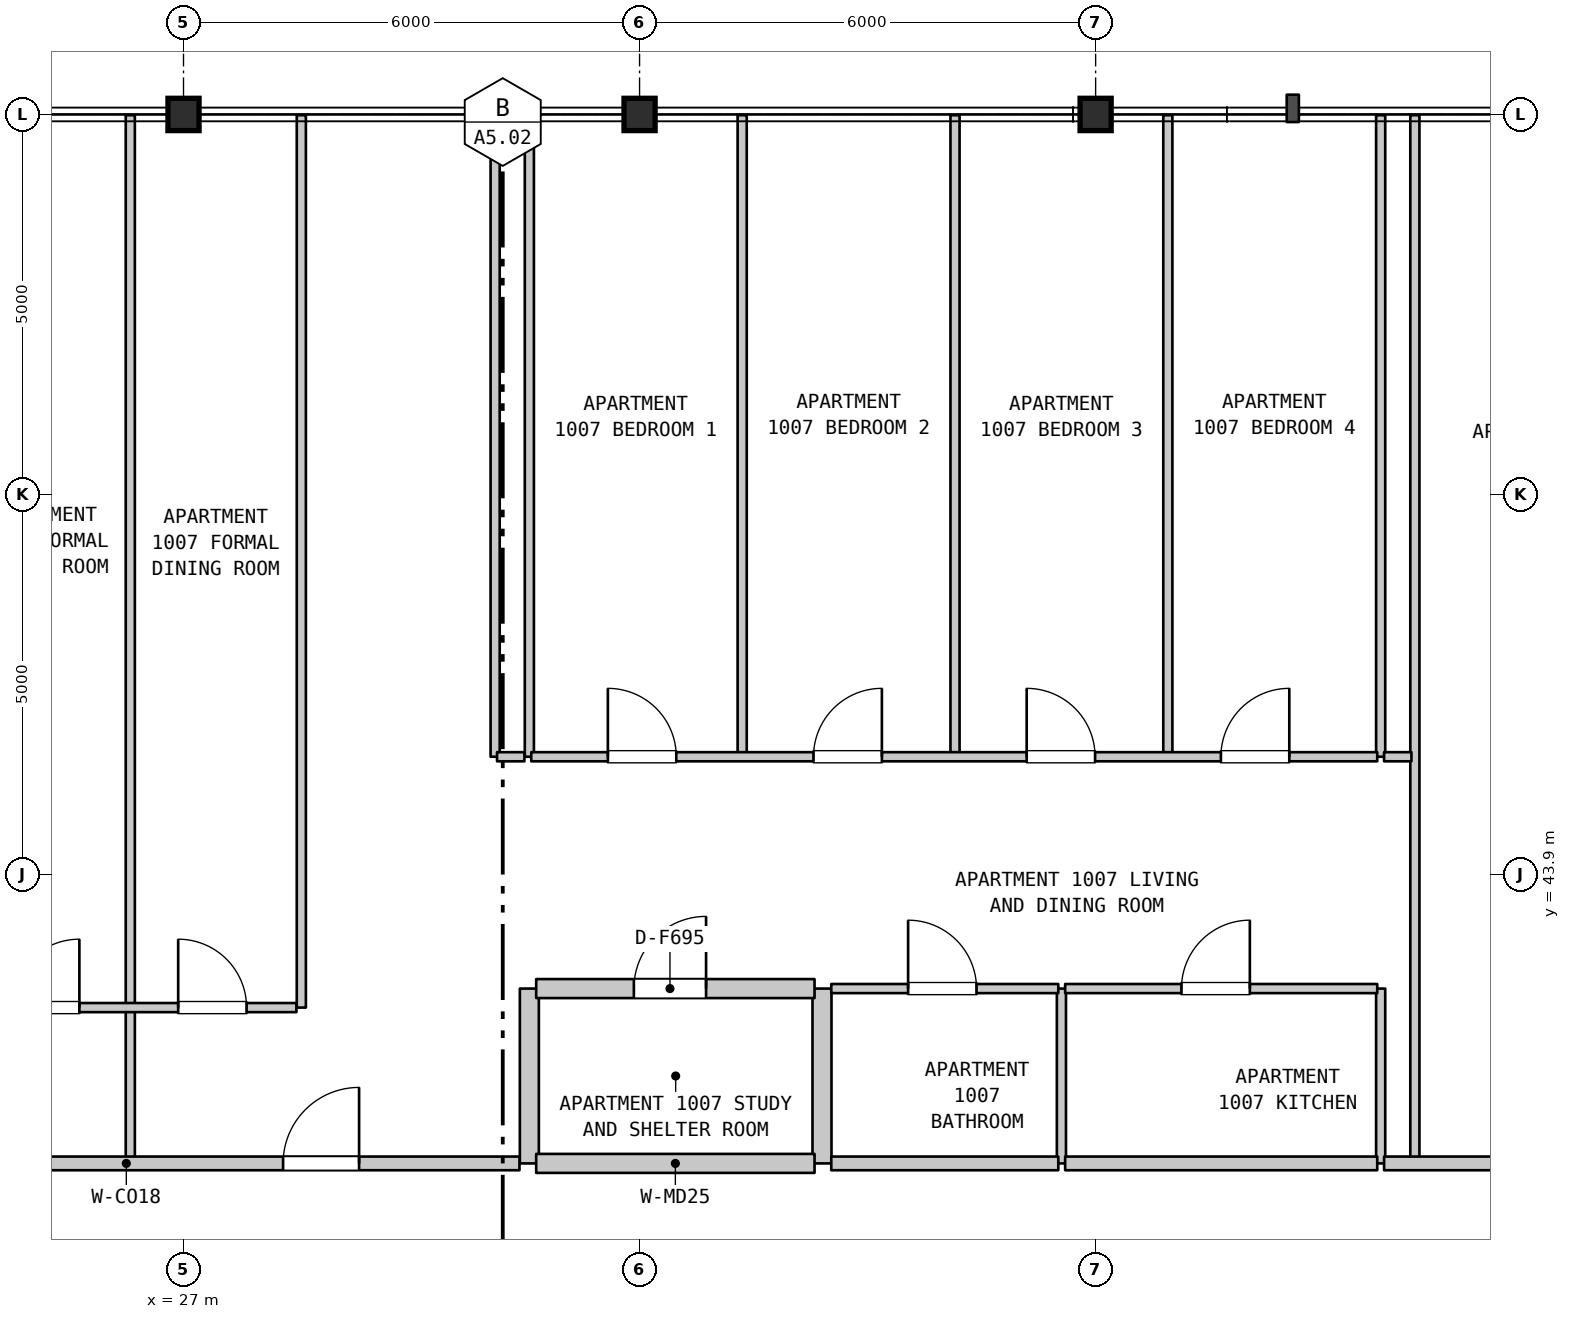
"""IFC4 building model, lengths in metres.
Left out: names, types, materials, properties, quantities, classifications, styles, units other than length and angle.
Written with IfcOpenShell. Run it as: python <this file> out.ifc"""

import sys

from ifc_helpers import new_model, si_unit, direction, frame, frame_2d, origin, origin_2d, place, context, subcontext, project, spatial, rectangle, i_section, extrude, element, fill, save


model = new_model("IFC4")
c1 = context("Model", 3, precision=1e-05, world=origin(), true_north=direction((0.0, 1.0)))
c2 = subcontext(c1, "Body", "Model", "MODEL_VIEW")
j1 = project(units=[si_unit("LENGTHUNIT", "METRE"), si_unit("PLANEANGLEUNIT", "RADIAN")], contexts=[c1])
p1 = place(None, origin())
s1 = spatial("IfcSite", under=j1, at=p1, CompositionType="ELEMENT")
p2 = place(p1, origin())
s2 = spatial("IfcBuilding", under=s1, at=p2, CompositionType="ELEMENT")
p3 = place(p2, frame((0.0, 0.0, 46.2)))
s3 = spatial("IfcBuildingStorey", under=s2, at=p3, CompositionType="ELEMENT", Elevation=46.2)
for number, where, z_axis, x_axis in (
    (1, (27.0, 53.9, 0.0), (0.0, 0.0, 1.0), (1.0, 0.0, 0.0)),
    (2, (33.0, 53.9, 0.0), (0.0, 0.0, 1.0), (1.0, 0.0, 0.0)),
    (3, (39.0, 53.9, 0.0), (0.0, 0.0, 1.0), (1.0, 0.0, 0.0)),
):
    element("IfcColumn", number, at=place(p3, frame(where, z_axis=z_axis, x_axis=x_axis)), inside=s3, PredefinedType="COLUMN", context=c2, shape_type="SweptSolid", body=[
        extrude(i_section(OverallWidth=0.409, OverallDepth=0.425, WebThickness=0.032, FlangeThickness=0.052, FilletRadius=0.015, at=origin_2d()), origin(), (0.0, 0.0, 1.0), 3.7),
    ])
p4 = place(p3, frame((26.3, 40.1, 0.0), z_axis=(0.0, 0.0, 1.0), x_axis=(0.0, 1.0, 0.0)))
e4 = element("IfcWall", 4, at=p4, inside=s3, PredefinedType="PARTITIONING", context=c2, shape_type="SweptSolid", body=[
    extrude(rectangle(XDim=2.05, YDim=0.12, at=frame_2d((1.025, 0.0))), origin(), (0.0, 0.0, 1.0), 3.385),
])
for number, where, z_axis, x_axis in (
    (5, (26.3, 42.15, 0.0), (0.0, 0.0, 1.0), (0.0, 1.0, 0.0)),
    (6, (28.55, 42.15, 0.0), (0.0, 0.0, 1.0), (0.0, 1.0, 0.0)),
):
    element("IfcWall", number, at=place(p3, frame(where, z_axis=z_axis, x_axis=x_axis)), inside=s3, PredefinedType="PARTITIONING", context=c2, shape_type="SweptSolid", body=[
        extrude(rectangle(XDim=11.74, YDim=0.12, at=frame_2d((5.87, 0.0))), origin(), (0.0, 0.0, 1.0), 3.385),
    ])
p5 = place(p3, frame((31.1, 45.45, 0.0), z_axis=(0.0, 0.0, 1.0), x_axis=(0.0, 1.0, 0.0)))
e7 = element("IfcWall", 7, at=p5, inside=s3, PredefinedType="PARTITIONING", context=c2, shape_type="SweptSolid", body=[
    extrude(rectangle(XDim=8.44, YDim=0.12, at=frame_2d((4.22, 0.0))), origin(), (0.0, 0.0, 1.0), 3.385),
])
p6 = place(p3, frame((31.55, 40.1, 0.0), z_axis=(0.0, 0.0, 1.0), x_axis=(0.0, 1.0, 0.0)))
e8 = element("IfcWall", 8, at=p6, inside=s3, PredefinedType="STANDARD", context=c2, shape_type="SweptSolid", body=[
    extrude(rectangle(XDim=2.3, YDim=0.25, at=frame_2d((1.15, 0.0))), origin(), (0.0, 0.0, 1.0), 3.385),
])
for number, where, z_axis, x_axis in (
    (9, (31.55, 45.45, 0.0), (0.0, 0.0, 1.0), (0.0, 1.0, 0.0)),
    (10, (34.35, 45.45, 0.0), (0.0, 0.0, 1.0), (0.0, 1.0, 0.0)),
):
    element("IfcWall", number, at=place(p3, frame(where, z_axis=z_axis, x_axis=x_axis)), inside=s3, PredefinedType="PARTITIONING", context=c2, shape_type="SweptSolid", body=[
        extrude(rectangle(XDim=8.44, YDim=0.12, at=frame_2d((4.22, 0.0))), origin(), (0.0, 0.0, 1.0), 3.385),
    ])
p7 = place(p3, frame((35.4, 40.1, 0.0), z_axis=(0.0, 0.0, 1.0), x_axis=(0.0, 1.0, 0.0)))
e11 = element("IfcWall", 11, at=p7, inside=s3, PredefinedType="STANDARD", context=c2, shape_type="SweptSolid", body=[
    extrude(rectangle(XDim=2.3, YDim=0.25, at=frame_2d((1.15, 0.0))), origin(), (0.0, 0.0, 1.0), 3.385),
])
p8 = place(p3, frame((37.15, 45.45, 0.0), z_axis=(0.0, 0.0, 1.0), x_axis=(0.0, 1.0, 0.0)))
e12 = element("IfcWall", 12, at=p8, inside=s3, PredefinedType="PARTITIONING", context=c2, shape_type="SweptSolid", body=[
    extrude(rectangle(XDim=8.44, YDim=0.12, at=frame_2d((4.22, 0.0))), origin(), (0.0, 0.0, 1.0), 3.385),
])
p9 = place(p3, frame((38.55, 40.1, 0.0), z_axis=(0.0, 0.0, 1.0), x_axis=(0.0, 1.0, 0.0)))
e13 = element("IfcWall", 13, at=p9, inside=s3, PredefinedType="PARTITIONING", context=c2, shape_type="SweptSolid", body=[
    extrude(rectangle(XDim=2.3, YDim=0.12, at=frame_2d((1.15, 0.0))), origin(), (0.0, 0.0, 1.0), 3.385),
])
p10 = place(p3, frame((39.95, 45.45, 0.0), z_axis=(0.0, 0.0, 1.0), x_axis=(0.0, 1.0, 0.0)))
e14 = element("IfcWall", 14, at=p10, inside=s3, PredefinedType="PARTITIONING", context=c2, shape_type="SweptSolid", body=[
    extrude(rectangle(XDim=8.44, YDim=0.12, at=frame_2d((4.22, 0.0))), origin(), (0.0, 0.0, 1.0), 3.385),
])
p11 = place(p3, frame((42.75, 40.1, 0.0), z_axis=(0.0, 0.0, 1.0), x_axis=(0.0, 1.0, 0.0)))
e15 = element("IfcWall", 15, at=p11, inside=s3, PredefinedType="PARTITIONING", context=c2, shape_type="SweptSolid", body=[
    extrude(rectangle(XDim=2.3, YDim=0.12, at=frame_2d((1.15, 0.0))), origin(), (0.0, 0.0, 1.0), 3.385),
])
p12 = place(p3, frame((42.75, 45.45, 0.0), z_axis=(0.0, 0.0, 1.0), x_axis=(0.0, 1.0, 0.0)))
e16 = element("IfcWall", 16, at=p12, inside=s3, PredefinedType="PARTITIONING", context=c2, shape_type="SweptSolid", body=[
    extrude(rectangle(XDim=8.44, YDim=0.12, at=frame_2d((4.22, 0.0))), origin(), (0.0, 0.0, 1.0), 3.385),
])
p13 = place(p3, frame((43.2, 40.1, 0.0), z_axis=(0.0, 0.0, 1.0), x_axis=(0.0, 1.0, 0.0)))
e17 = element("IfcWall", 17, at=p13, inside=s3, PredefinedType="PARTITIONING", context=c2, shape_type="SweptSolid", body=[
    extrude(rectangle(XDim=13.79, YDim=0.12, at=frame_2d((6.895, 0.0))), origin(), (0.0, 0.0, 1.0), 3.385),
])
p14 = place(p3, frame((21.075, 40.1, 0.0), z_axis=(0.0, 0.0, 1.0), x_axis=(1.0, 0.0, 0.0)))
e18 = element("IfcWall", 18, at=p14, inside=s3, PredefinedType="STANDARD", context=c2, shape_type="SweptSolid", body=[
    extrude(rectangle(XDim=10.345, YDim=0.18, at=frame_2d((5.172, 0.0))), origin(), (0.0, 0.0, 1.0), 3.385),
])
p15 = place(p14, frame((2.035, 0.0, 0.0)))
e19 = element("IfcOpeningElement", 19, at=p15, cuts=e18, PredefinedType="OPENING", context=c2, shape_type="SweptSolid", body=[
    extrude(rectangle(XDim=1.0, YDim=2.15, at=frame_2d((0.5, 1.075))), frame((0.0, 0.1, 0.0), z_axis=(0.0, -1.0, 0.0), x_axis=(1.0, 0.0, 0.0)), (0.0, 0.0, 1.0), 0.2),
])
p16 = place(p14, frame((7.235, 0.0, 0.0)))
e20 = element("IfcOpeningElement", 20, at=p16, cuts=e18, PredefinedType="OPENING", context=c2, shape_type="SweptSolid", body=[
    extrude(rectangle(XDim=1.0, YDim=2.15, at=frame_2d((0.5, 1.075))), frame((0.0, 0.1, 0.0), z_axis=(0.0, -1.0, 0.0), x_axis=(1.0, 0.0, 0.0)), (0.0, 0.0, 1.0), 0.2),
])
p17 = place(p3, frame((31.64, 40.1, 0.0), z_axis=(0.0, 0.0, 1.0), x_axis=(1.0, 0.0, 0.0)))
e21 = element("IfcWall", 21, at=p17, inside=s3, PredefinedType="STANDARD", context=c2, shape_type="SweptSolid", body=[
    extrude(rectangle(XDim=3.662, YDim=0.25, at=frame_2d((1.831, 0.0))), origin(), (0.0, 0.0, 1.0), 3.385),
])
p18 = place(p3, frame((35.522, 40.1, 0.0), z_axis=(0.0, 0.0, 1.0), x_axis=(1.0, 0.0, 0.0)))
e22 = element("IfcWall", 22, at=p18, inside=s3, PredefinedType="STANDARD", context=c2, shape_type="SweptSolid", body=[
    extrude(rectangle(XDim=2.987, YDim=0.18, at=frame_2d((1.494, 0.0))), origin(), (0.0, 0.0, 1.0), 3.385),
])
p19 = place(p3, frame((38.599, 40.1, 0.0), z_axis=(0.0, 0.0, 1.0), x_axis=(1.0, 0.0, 0.0)))
e23 = element("IfcWall", 23, at=p19, inside=s3, PredefinedType="STANDARD", context=c2, shape_type="SweptSolid", body=[
    extrude(rectangle(XDim=4.106, YDim=0.18, at=frame_2d((2.053, 0.0))), origin(), (0.0, 0.0, 1.0), 3.385),
])
p20 = place(p3, frame((42.795, 40.1, 0.0), z_axis=(0.0, 0.0, 1.0), x_axis=(1.0, 0.0, 0.0)))
e24 = element("IfcWall", 24, at=p20, inside=s3, PredefinedType="STANDARD", context=c2, shape_type="SweptSolid", body=[
    extrude(rectangle(XDim=3.96, YDim=0.18, at=frame_2d((1.98, 0.0))), origin(), (0.0, 0.0, 1.0), 3.385),
])
p21 = place(p20, frame((1.609, 0.0, 0.0)))
e25 = element("IfcOpeningElement", 25, at=p21, cuts=e24, PredefinedType="OPENING", context=c2, shape_type="SweptSolid", body=[
    extrude(rectangle(XDim=1.0, YDim=2.15, at=frame_2d((0.5, 1.075))), frame((0.0, 0.1, 0.0), z_axis=(0.0, -1.0, 0.0), x_axis=(1.0, 0.0, 0.0)), (0.0, 0.0, 1.0), 0.2),
])
p22 = place(p3, frame((24.075, 42.15, 0.0), z_axis=(0.0, 0.0, 1.0), x_axis=(1.0, 0.0, 0.0)))
e26 = element("IfcWall", 26, at=p22, inside=s3, PredefinedType="PARTITIONING", context=c2, shape_type="SweptSolid", body=[
    extrude(rectangle(XDim=4.41, YDim=0.12, at=frame_2d((2.205, 0.0))), origin(), (0.0, 0.0, 1.0), 3.385),
])
p23 = place(p22, frame((0.655, 0.0, 0.0)))
e27 = element("IfcOpeningElement", 27, at=p23, cuts=e26, PredefinedType="OPENING", context=c2, shape_type="SweptSolid", body=[
    extrude(rectangle(XDim=0.9, YDim=2.15, at=frame_2d((0.45, 1.075))), frame((0.0, 0.07, 0.0), z_axis=(0.0, -1.0, 0.0), x_axis=(1.0, 0.0, 0.0)), (0.0, 0.0, 1.0), 0.14),
])
p24 = place(p22, frame((2.855, 0.0, 0.0)))
e28 = element("IfcOpeningElement", 28, at=p24, cuts=e26, PredefinedType="OPENING", context=c2, shape_type="SweptSolid", body=[
    extrude(rectangle(XDim=0.9, YDim=2.15, at=frame_2d((0.45, 1.075))), frame((0.0, 0.07, 0.0), z_axis=(0.0, -1.0, 0.0), x_axis=(1.0, 0.0, 0.0)), (0.0, 0.0, 1.0), 0.14),
])
p25 = place(p3, frame((31.64, 42.4, 0.0), z_axis=(0.0, 0.0, 1.0), x_axis=(1.0, 0.0, 0.0)))
e29 = element("IfcWall", 29, at=p25, inside=s3, PredefinedType="STANDARD", context=c2, shape_type="SweptSolid", body=[
    extrude(rectangle(XDim=3.662, YDim=0.25, at=frame_2d((1.831, 0.0))), origin(), (0.0, 0.0, 1.0), 3.385),
])
p26 = place(p25, frame((1.285, 0.0, 0.0)))
e30 = element("IfcOpeningElement", 30, at=p26, cuts=e29, PredefinedType="OPENING", context=c2, shape_type="SweptSolid", body=[
    extrude(rectangle(XDim=0.95, YDim=2.15, at=frame_2d((0.475, 1.075))), frame((0.0, 0.135, 0.0), z_axis=(0.0, -1.0, 0.0), x_axis=(1.0, 0.0, 0.0)), (0.0, 0.0, 1.0), 0.27),
])
p27 = place(p3, frame((35.522, 42.4, 0.0), z_axis=(0.0, 0.0, 1.0), x_axis=(1.0, 0.0, 0.0)))
e31 = element("IfcWall", 31, at=p27, inside=s3, PredefinedType="PARTITIONING", context=c2, shape_type="SweptSolid", body=[
    extrude(rectangle(XDim=2.987, YDim=0.12, at=frame_2d((1.494, 0.0))), origin(), (0.0, 0.0, 1.0), 3.385),
])
p28 = place(p27, frame((1.011, 0.0, 0.0)))
e32 = element("IfcOpeningElement", 32, at=p28, cuts=e31, PredefinedType="OPENING", context=c2, shape_type="SweptSolid", body=[
    extrude(rectangle(XDim=0.9, YDim=2.1, at=frame_2d((0.45, 1.05))), frame((0.0, 0.07, 0.0), z_axis=(0.0, -1.0, 0.0), x_axis=(1.0, 0.0, 0.0)), (0.0, 0.0, 1.0), 0.14),
])
p29 = place(p3, frame((38.599, 42.4, 0.0), z_axis=(0.0, 0.0, 1.0), x_axis=(1.0, 0.0, 0.0)))
e33 = element("IfcWall", 33, at=p29, inside=s3, PredefinedType="PARTITIONING", context=c2, shape_type="SweptSolid", body=[
    extrude(rectangle(XDim=4.106, YDim=0.12, at=frame_2d((2.053, 0.0))), origin(), (0.0, 0.0, 1.0), 3.385),
])
p30 = place(p29, frame((1.53, 0.0, 0.0)))
e34 = element("IfcOpeningElement", 34, at=p30, cuts=e33, PredefinedType="OPENING", context=c2, shape_type="SweptSolid", body=[
    extrude(rectangle(XDim=0.9, YDim=2.15, at=frame_2d((0.45, 1.075))), frame((0.0, 0.07, 0.0), z_axis=(0.0, -1.0, 0.0), x_axis=(1.0, 0.0, 0.0)), (0.0, 0.0, 1.0), 0.14),
])
p31 = place(p3, frame((31.125, 45.45, 0.0), z_axis=(0.0, 0.0, 1.0), x_axis=(1.0, 0.0, 0.0)))
e35 = element("IfcWall", 35, at=p31, inside=s3, PredefinedType="PARTITIONING", context=c2, shape_type="SweptSolid", body=[
    extrude(rectangle(XDim=0.36, YDim=0.12, at=frame_2d((0.18, 0.0))), origin(), (0.0, 0.0, 1.0), 3.385),
])
p32 = place(p3, frame((31.575, 45.45, 0.0), z_axis=(0.0, 0.0, 1.0), x_axis=(1.0, 0.0, 0.0)))
e36 = element("IfcWall", 36, at=p32, inside=s3, PredefinedType="PARTITIONING", context=c2, shape_type="SweptSolid", body=[
    extrude(rectangle(XDim=11.13, YDim=0.12, at=frame_2d((5.565, 0.0))), origin(), (0.0, 0.0, 1.0), 3.385),
])
p33 = place(p32, frame((1.008, 0.0, 0.0)))
e37 = element("IfcOpeningElement", 37, at=p33, cuts=e36, PredefinedType="OPENING", context=c2, shape_type="SweptSolid", body=[
    extrude(rectangle(XDim=0.9, YDim=2.15, at=frame_2d((0.45, 1.075))), frame((0.0, 0.07, 0.0), z_axis=(0.0, -1.0, 0.0), x_axis=(1.0, 0.0, 0.0)), (0.0, 0.0, 1.0), 0.14),
])
p34 = place(p32, frame((3.713, 0.0, 0.0)))
e38 = element("IfcOpeningElement", 38, at=p34, cuts=e36, PredefinedType="OPENING", context=c2, shape_type="SweptSolid", body=[
    extrude(rectangle(XDim=0.9, YDim=2.15, at=frame_2d((0.45, 1.075))), frame((0.0, 0.07, 0.0), z_axis=(0.0, -1.0, 0.0), x_axis=(1.0, 0.0, 0.0)), (0.0, 0.0, 1.0), 0.14),
])
p35 = place(p32, frame((6.518, 0.0, 0.0)))
e39 = element("IfcOpeningElement", 39, at=p35, cuts=e36, PredefinedType="OPENING", context=c2, shape_type="SweptSolid", body=[
    extrude(rectangle(XDim=0.9, YDim=2.15, at=frame_2d((0.45, 1.075))), frame((0.0, 0.07, 0.0), z_axis=(0.0, -1.0, 0.0), x_axis=(1.0, 0.0, 0.0)), (0.0, 0.0, 1.0), 0.14),
])
p36 = place(p32, frame((9.073, 0.0, 0.0)))
e40 = element("IfcOpeningElement", 40, at=p36, cuts=e36, PredefinedType="OPENING", context=c2, shape_type="SweptSolid", body=[
    extrude(rectangle(XDim=0.9, YDim=2.15, at=frame_2d((0.45, 1.075))), frame((0.0, 0.07, 0.0), z_axis=(0.0, -1.0, 0.0), x_axis=(1.0, 0.0, 0.0)), (0.0, 0.0, 1.0), 0.14),
])
p37 = place(p3, frame((42.795, 45.45, 0.0), z_axis=(0.0, 0.0, 1.0), x_axis=(1.0, 0.0, 0.0)))
e41 = element("IfcWall", 41, at=p37, inside=s3, PredefinedType="PARTITIONING", context=c2, shape_type="SweptSolid", body=[
    extrude(rectangle(XDim=0.36, YDim=0.12, at=frame_2d((0.18, 0.0))), origin(), (0.0, 0.0, 1.0), 3.385),
])
p38 = place(p16, origin())
e42 = element("IfcDoor", 42, at=p38, inside=s3, OperationType="SINGLE_SWING_RIGHT", PredefinedType="DOOR", context=c2, shape_type="SweptSolid", body=[
    extrude(rectangle(XDim=1.0, YDim=2.15, at=frame_2d((0.5, 1.075))), frame((0.0, 0.025, 0.0), z_axis=(0.0, -1.0, 0.0), x_axis=(1.0, 0.0, 0.0)), (0.0, 0.0, 1.0), 0.05),
])
fill(e20, e42)
p39 = place(p23, origin())
e43 = element("IfcDoor", 43, at=p39, inside=s3, OperationType="SINGLE_SWING_RIGHT", PredefinedType="DOOR", context=c2, shape_type="SweptSolid", body=[
    extrude(rectangle(XDim=0.9, YDim=2.15, at=frame_2d((0.45, 1.075))), frame((0.0, 0.025, 0.0), z_axis=(0.0, -1.0, 0.0), x_axis=(1.0, 0.0, 0.0)), (0.0, 0.0, 1.0), 0.05),
])
fill(e27, e43)
p40 = place(p24, origin())
e44 = element("IfcDoor", 44, at=p40, inside=s3, OperationType="SINGLE_SWING_LEFT", PredefinedType="DOOR", context=c2, shape_type="SweptSolid", body=[
    extrude(rectangle(XDim=0.9, YDim=2.15, at=frame_2d((0.45, 1.075))), frame((0.0, 0.025, 0.0), z_axis=(0.0, -1.0, 0.0), x_axis=(1.0, 0.0, 0.0)), (0.0, 0.0, 1.0), 0.05),
])
fill(e28, e44)
p41 = place(p26, origin())
e45 = element("IfcDoor", 45, at=p41, inside=s3, OperationType="SINGLE_SWING_RIGHT", PredefinedType="DOOR", context=c2, shape_type="SweptSolid", body=[
    extrude(rectangle(XDim=0.95, YDim=2.15, at=frame_2d((0.475, 1.075))), frame((0.0, 0.025, 0.0), z_axis=(0.0, -1.0, 0.0), x_axis=(1.0, 0.0, 0.0)), (0.0, 0.0, 1.0), 0.05),
])
fill(e30, e45)
p42 = place(p28, origin())
e46 = element("IfcDoor", 46, at=p42, inside=s3, OperationType="SINGLE_SWING_LEFT", PredefinedType="DOOR", context=c2, shape_type="SweptSolid", body=[
    extrude(rectangle(XDim=0.9, YDim=2.1, at=frame_2d((0.45, 1.05))), frame((0.0, 0.025, 0.0), z_axis=(0.0, -1.0, 0.0), x_axis=(1.0, 0.0, 0.0)), (0.0, 0.0, 1.0), 0.05),
])
fill(e32, e46)
p43 = place(p30, origin())
e47 = element("IfcDoor", 47, at=p43, inside=s3, OperationType="SINGLE_SWING_RIGHT", PredefinedType="DOOR", context=c2, shape_type="SweptSolid", body=[
    extrude(rectangle(XDim=0.9, YDim=2.15, at=frame_2d((0.45, 1.075))), frame((0.0, 0.025, 0.0), z_axis=(0.0, -1.0, 0.0), x_axis=(1.0, 0.0, 0.0)), (0.0, 0.0, 1.0), 0.05),
])
fill(e34, e47)
p44 = place(p33, origin())
e48 = element("IfcDoor", 48, at=p44, inside=s3, OperationType="SINGLE_SWING_LEFT", PredefinedType="DOOR", context=c2, shape_type="SweptSolid", body=[
    extrude(rectangle(XDim=0.9, YDim=2.15, at=frame_2d((0.45, 1.075))), frame((0.0, 0.025, 0.0), z_axis=(0.0, -1.0, 0.0), x_axis=(1.0, 0.0, 0.0)), (0.0, 0.0, 1.0), 0.05),
])
fill(e37, e48)
p45 = place(p34, origin())
e49 = element("IfcDoor", 49, at=p45, inside=s3, OperationType="SINGLE_SWING_RIGHT", PredefinedType="DOOR", context=c2, shape_type="SweptSolid", body=[
    extrude(rectangle(XDim=0.9, YDim=2.15, at=frame_2d((0.45, 1.075))), frame((0.0, 0.025, 0.0), z_axis=(0.0, -1.0, 0.0), x_axis=(1.0, 0.0, 0.0)), (0.0, 0.0, 1.0), 0.05),
])
fill(e38, e49)
p46 = place(p35, origin())
e50 = element("IfcDoor", 50, at=p46, inside=s3, OperationType="SINGLE_SWING_LEFT", PredefinedType="DOOR", context=c2, shape_type="SweptSolid", body=[
    extrude(rectangle(XDim=0.9, YDim=2.15, at=frame_2d((0.45, 1.075))), frame((0.0, 0.025, 0.0), z_axis=(0.0, -1.0, 0.0), x_axis=(1.0, 0.0, 0.0)), (0.0, 0.0, 1.0), 0.05),
])
fill(e39, e50)
p47 = place(p36, origin())
e51 = element("IfcDoor", 51, at=p47, inside=s3, OperationType="SINGLE_SWING_RIGHT", PredefinedType="DOOR", context=c2, shape_type="SweptSolid", body=[
    extrude(rectangle(XDim=0.9, YDim=2.15, at=frame_2d((0.45, 1.075))), frame((0.0, 0.025, 0.0), z_axis=(0.0, -1.0, 0.0), x_axis=(1.0, 0.0, 0.0)), (0.0, 0.0, 1.0), 0.05),
])
fill(e40, e51)
save(model, sys.argv[1])
